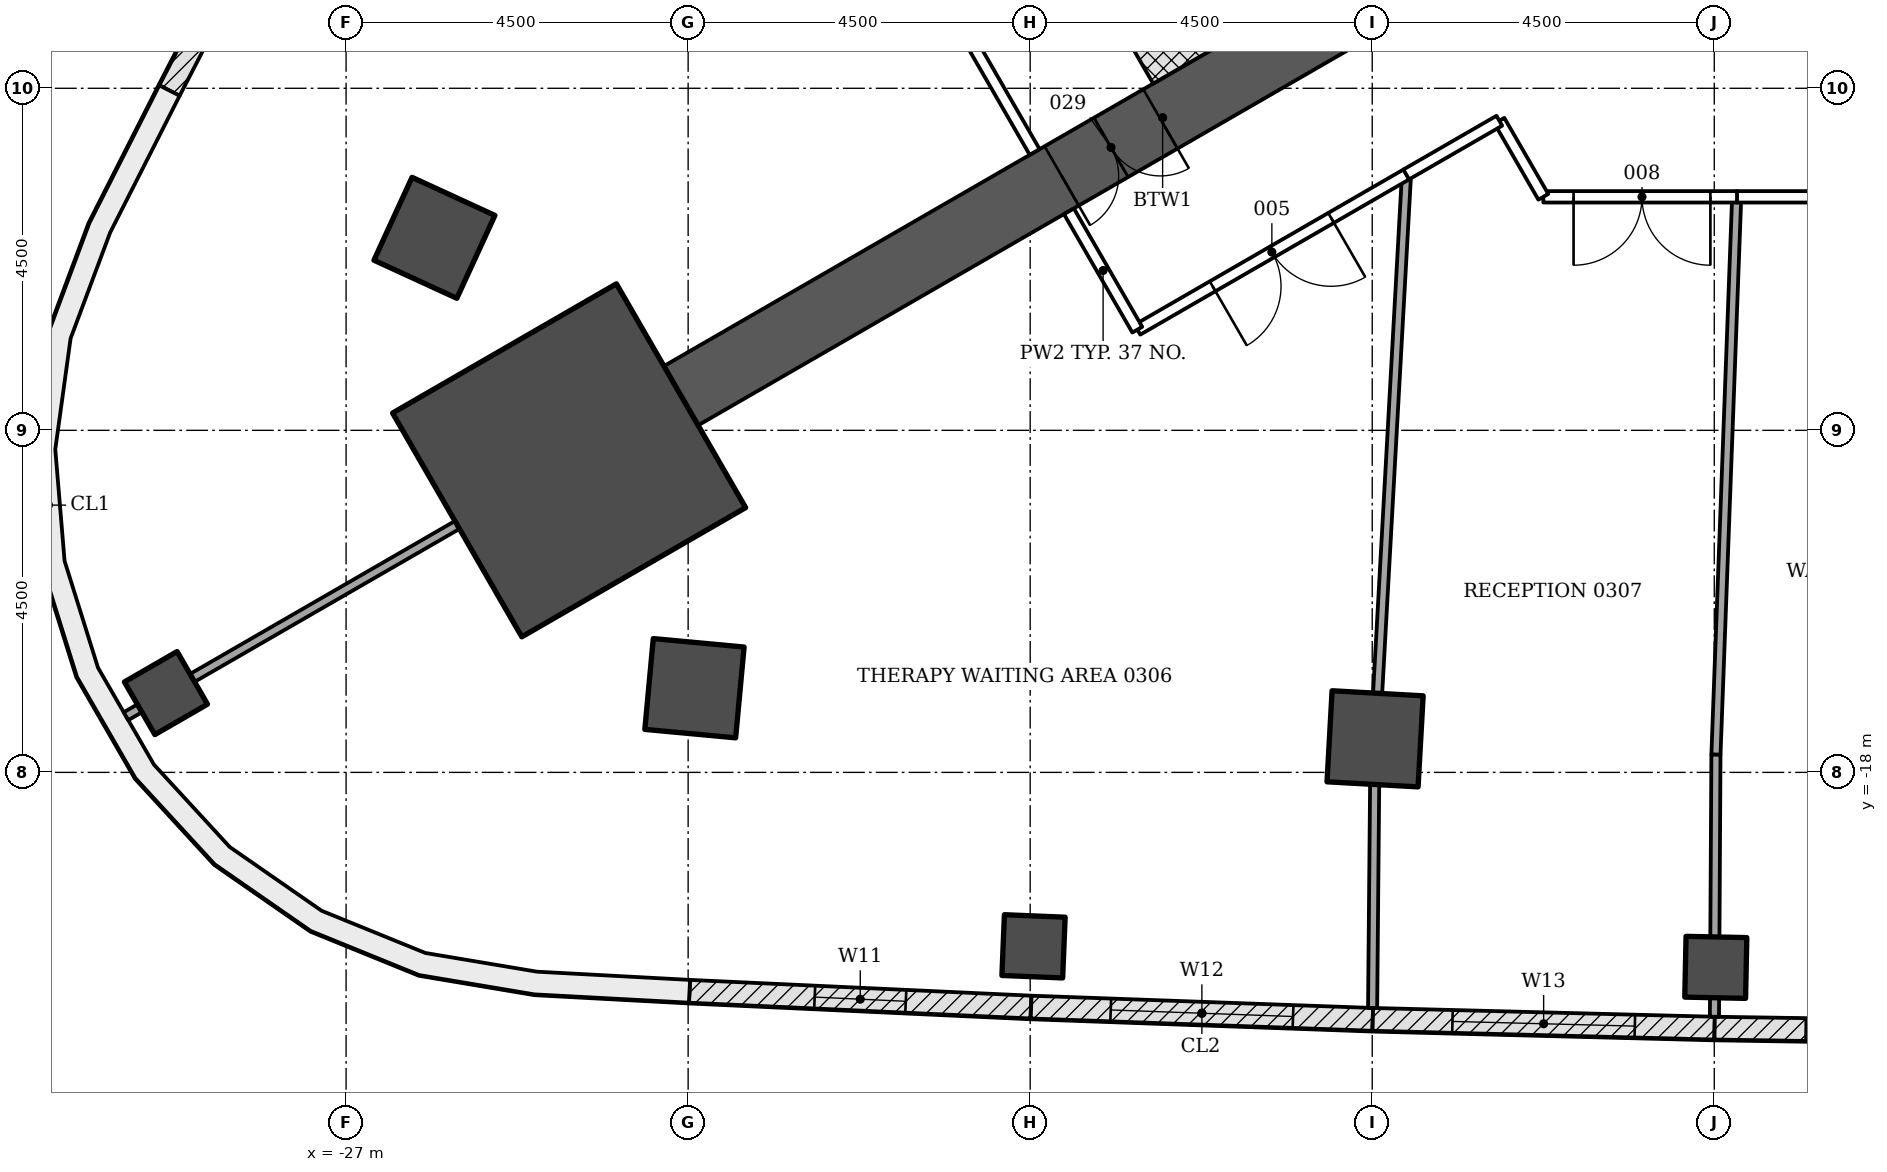
"""IFC4 building model, lengths in metres.
Left out: names, types, materials, properties, quantities, classifications, styles, units other than length and angle.
Written with IfcOpenShell. Run it as: python <this file> out.ifc"""

import sys

from ifc_helpers import new_model, si_unit, direction, frame, frame_2d, origin, origin_2d, place, context, subcontext, project, spatial, polyline, rectangle, outline, extrude, element, fill, save


model = new_model("IFC4")
c1 = context("Model", 3, precision=1e-05, world=origin(), true_north=direction((0.0, 1.0)))
c2 = subcontext(c1, "Body", "Model", "MODEL_VIEW")
j1 = project(units=[si_unit("LENGTHUNIT", "METRE"), si_unit("PLANEANGLEUNIT", "RADIAN")], contexts=[c1])
p1 = place(None, origin())
s1 = spatial("IfcSite", under=j1, at=p1, CompositionType="ELEMENT")
p2 = place(p1, origin())
s2 = spatial("IfcBuilding", under=s1, at=p2, CompositionType="ELEMENT")
p3 = place(p2, frame((0.0, 0.0, 15.0)))
s3 = spatial("IfcBuildingStorey", under=s2, at=p3, CompositionType="ELEMENT", Elevation=15.0)
for number, where, z_axis, x_axis in (
    (1, (-25.838, -10.967, -0.25), (0.0, 0.0, 1.0), (-0.909, 0.418, 0.0)),
    (2, (-22.417, -16.893, -0.25), (0.0, 0.0, 1.0), (-0.093, -0.996, 0.0)),
    (3, (-13.462, -17.558, -0.25), (0.0, 0.0, 1.0), (-0.056, -0.998, 0.0)),
):
    element("IfcColumn", number, at=place(p3, frame(where, z_axis=z_axis, x_axis=x_axis)), inside=s3, PredefinedType="COLUMN", context=c2, shape_type="SweptSolid", body=[
        extrude(rectangle(XDim=1.2, YDim=1.2, at=origin_2d()), origin(), (0.0, 0.0, 1.0), 4.5),
    ])
for number, where, z_axis, x_axis in (
    (4, (-29.37, -16.957, -0.25), (0.0, 0.0, 1.0), (-0.866, -0.5, 0.0)),
    (5, (-17.956, -20.288, -0.25), (0.0, 0.0, 1.0), (-0.041, -0.999, 0.0)),
    (6, (-8.98, -20.565, -0.25), (0.0, 0.0, 1.0), (-0.021, -1.0, 0.0)),
):
    element("IfcColumn", number, at=place(p3, frame(where, z_axis=z_axis, x_axis=x_axis)), inside=s3, PredefinedType="COLUMN", context=c2, shape_type="SweptSolid", body=[
        extrude(rectangle(XDim=0.8, YDim=0.8, at=origin_2d()), origin(), (0.0, 0.0, 1.0), 4.5),
    ])
p4 = place(p3, frame((-9.922, -5.728, -0.25), z_axis=(0.0, 0.0, 1.0), x_axis=(-0.866028046028, -0.499995423472, 0.0)))
e7 = element("IfcWall", 7, at=p4, inside=s3, PredefinedType="SHEAR", context=c2, shape_type="SweptSolid", body=[
    extrude(rectangle(XDim=14.633, YDim=0.9, at=frame_2d((7.316, 0.0))), origin(), (0.0, 0.0, 1.0), 4.5),
])
p5 = place(p4, frame((7.35, 0.0, 0.25)))
e8 = element("IfcOpeningElement", 8, at=p5, cuts=e7, PredefinedType="OPENING", context=c2, shape_type="SweptSolid", body=[
    extrude(rectangle(XDim=1.5, YDim=2.1, at=frame_2d((0.75, 1.05))), frame((0.0, 0.46, 0.0), z_axis=(0.0, -1.0, 0.0), x_axis=(1.0, 0.0, 0.0)), (0.0, 0.0, 1.0), 0.92),
])
p6 = place(p3, frame((-24.066, -13.895, -0.25), z_axis=(0.0, 0.0, 1.0), x_axis=(-0.866025403784, -0.5, 0.0)))
e9 = element("IfcColumn", 9, at=p6, inside=s3, PredefinedType="COLUMN", context=c2, shape_type="SweptSolid", body=[
    extrude(rectangle(XDim=3.4, YDim=3.4, at=origin_2d()), origin(), (0.0, 0.0, 1.0), 4.5),
])
p7 = place(p3, frame((-29.323, -9.029, 0.0), z_axis=(0.0, 0.0, 1.0), x_axis=(0.459443600121, 0.888206945654, 0.0)))
e10 = element("IfcWall", 10, at=p7, inside=s3, PredefinedType="NOTDEFINED", context=c2, shape_type="SweptSolid", body=[
    extrude(rectangle(XDim=4.496, YDim=0.3, at=frame_2d((2.248, 0.0))), origin(), (0.0, 0.0, 1.0), 4.25),
])
p8 = place(p7, frame((1.648, 0.0, 0.8)))
e11 = element("IfcOpeningElement", 11, at=p8, cuts=e10, PredefinedType="OPENING", context=c2, shape_type="SweptSolid", body=[
    extrude(rectangle(XDim=1.2, YDim=3.0, at=frame_2d((0.6, 1.5))), frame((0.0, 0.16, 0.0), z_axis=(0.0, -1.0, 0.0), x_axis=(1.0, 0.0, 0.0)), (0.0, 0.0, 1.0), 0.32),
])
p9 = place(p3, frame((-17.99, -21.088, 0.0), z_axis=(0.0, 0.0, 1.0), x_axis=(-0.998931717866, 0.046210637742, 0.0)))
e12 = element("IfcWall", 12, at=p9, inside=s3, PredefinedType="NOTDEFINED", context=c2, shape_type="SweptSolid", body=[
    extrude(rectangle(XDim=4.496, YDim=0.3, at=frame_2d((2.248, 0.0))), origin(), (0.0, 0.0, 1.0), 4.25),
])
p10 = place(p9, frame((1.648, 0.0, 0.8)))
e13 = element("IfcOpeningElement", 13, at=p10, cuts=e12, PredefinedType="OPENING", context=c2, shape_type="SweptSolid", body=[
    extrude(rectangle(XDim=1.2, YDim=3.0, at=frame_2d((0.6, 1.5))), frame((0.0, 0.16, 0.0), z_axis=(0.0, -1.0, 0.0), x_axis=(1.0, 0.0, 0.0)), (0.0, 0.0, 1.0), 0.32),
])
p11 = place(p3, frame((-13.494, -21.249, 0.0), z_axis=(0.0, 0.0, 1.0), x_axis=(-0.999355640029, 0.035892962294, 0.0)))
e14 = element("IfcWall", 14, at=p11, inside=s3, PredefinedType="NOTDEFINED", context=c2, shape_type="SweptSolid", body=[
    extrude(rectangle(XDim=4.496, YDim=0.3, at=frame_2d((2.248, 0.0))), origin(), (0.0, 0.0, 1.0), 4.25),
])
p12 = place(p11, frame((1.048, 0.0, 0.9)))
e15 = element("IfcOpeningElement", 15, at=p12, cuts=e14, PredefinedType="OPENING", context=c2, shape_type="SweptSolid", body=[
    extrude(rectangle(XDim=2.4, YDim=2.4, at=frame_2d((1.2, 1.2))), frame((0.0, 0.16, 0.0), z_axis=(0.0, -1.0, 0.0), x_axis=(1.0, 0.0, 0.0)), (0.0, 0.0, 1.0), 0.32),
])
p13 = place(p3, frame((-8.998, -21.365, 0.0), z_axis=(0.0, 0.0, 1.0), x_axis=(-0.999671466587, 0.025631209312, 0.0)))
e16 = element("IfcWall", 16, at=p13, inside=s3, PredefinedType="NOTDEFINED", context=c2, shape_type="SweptSolid", body=[
    extrude(rectangle(XDim=4.496, YDim=0.3, at=frame_2d((2.248, 0.0))), origin(), (0.0, 0.0, 1.0), 4.25),
])
p14 = place(p13, frame((1.048, 0.0, 0.9)))
e17 = element("IfcOpeningElement", 17, at=p14, cuts=e16, PredefinedType="OPENING", context=c2, shape_type="SweptSolid", body=[
    extrude(rectangle(XDim=2.4, YDim=2.4, at=frame_2d((1.2, 1.2))), frame((0.0, 0.16, 0.0), z_axis=(0.0, -1.0, 0.0), x_axis=(1.0, 0.0, 0.0)), (0.0, 0.0, 1.0), 0.32),
])
p15 = place(p3, frame((-4.5, -21.434, 0.0), z_axis=(0.0, 0.0, 1.0), x_axis=(-0.999881921814, 0.015366926462, 0.0)))
e18 = element("IfcWall", 18, at=p15, inside=s3, PredefinedType="NOTDEFINED", context=c2, shape_type="SweptSolid", body=[
    extrude(rectangle(XDim=4.496, YDim=0.3, at=frame_2d((2.248, 0.0))), origin(), (0.0, 0.0, 1.0), 4.25),
])
p16 = place(p15, frame((1.198, 0.0, 0.8)))
e19 = element("IfcOpeningElement", 19, at=p16, cuts=e18, PredefinedType="OPENING", context=c2, shape_type="SweptSolid", body=[
    extrude(rectangle(XDim=2.1, YDim=3.0, at=frame_2d((1.05, 1.5))), frame((0.0, 0.16, 0.0), z_axis=(0.0, -1.0, 0.0), x_axis=(1.0, 0.0, 0.0)), (0.0, 0.0, 1.0), 0.32),
])
p17 = place(p3, origin())
e20 = element("IfcWall", 20, at=p17, inside=s3, PredefinedType="NOTDEFINED", context=c2, shape_type="SweptSolid", body=[
    extrude(outline(polyline([(-29.457, -8.962), (-30.379, -10.776), (-30.917, -12.218), (-31.128, -13.742), (-31.0, -15.276), (-30.54, -16.744), (-29.771, -18.077), (-28.729, -19.209), (-27.465, -20.086), (-26.04, -20.666), (-24.522, -20.921), (-22.49, -21.03), (-22.474, -20.73), (-24.489, -20.622), (-25.957, -20.376), (-27.321, -19.821), (-28.531, -18.981), (-29.528, -17.898), (-30.264, -16.623), (-30.704, -15.218), (-30.826, -13.75), (-30.625, -12.292), (-30.104, -10.897), (-29.19, -9.098), (-29.457, -8.962)])), origin(), (0.0, 0.0, 1.0), 4.25),
])
p18 = place(p3, frame((-10.43, -4.847, -0.25), z_axis=(0.0, 0.0, 1.0), x_axis=(-0.866018442252, -0.500012057535, 0.0)))
e21 = element("IfcWall", 21, at=p18, inside=s3, PredefinedType="SHEAR", context=c2, shape_type="SweptSolid", body=[
    extrude(rectangle(XDim=7.2, YDim=1.136, at=frame_2d((3.6, 0.0))), origin(), (0.0, 0.0, 1.0), 4.5),
])
p19 = place(p3, frame((-13.495, -21.099, 0.0), z_axis=(0.0, 0.0, 1.0), x_axis=(0.009216581037, 0.999957526415, 0.0)))
e22 = element("IfcWall", 22, at=p19, inside=s3, PredefinedType="PARTITIONING", context=c2, shape_type="SweptSolid", body=[
    extrude(rectangle(XDim=2.94, YDim=0.12, at=frame_2d((1.47, 0.0))), origin(), (0.0, 0.0, 1.0), 3.633),
])
p20 = place(p3, frame((-13.429, -16.96, 0.0), z_axis=(0.0, 0.0, 1.0), x_axis=(0.055551088657, 0.998455846069, 0.0)))
e23 = element("IfcWall", 23, at=p20, inside=s3, PredefinedType="PARTITIONING", context=c2, shape_type="SweptSolid", body=[
    extrude(rectangle(XDim=6.838, YDim=0.12, at=frame_2d((3.419, 0.0))), origin(), (0.0, 0.0, 1.0), 3.638),
])
p21 = place(p3, frame((-13.045, -10.13, 0.0), z_axis=(0.0, 0.0, 1.0), x_axis=(-0.866035577775, -0.499982377718, 0.0)))
e24 = element("IfcWall", 24, at=p21, inside=s3, PredefinedType="PARTITIONING", context=c2, shape_type="SweptSolid", body=[
    extrude(rectangle(XDim=4.093, YDim=0.15, at=frame_2d((2.046, 0.0))), origin(), (0.0, 0.0, 1.0), 3.638),
])
p22 = place(p21, frame((1.15, 0.0, 0.0)))
e25 = element("IfcOpeningElement", 25, at=p22, cuts=e24, PredefinedType="OPENING", context=c2, shape_type="SweptSolid", body=[
    extrude(rectangle(XDim=1.8, YDim=2.1, at=frame_2d((0.9, 1.05))), frame((0.0, 0.085, 0.0), z_axis=(0.0, -1.0, 0.0), x_axis=(1.0, 0.0, 0.0)), (0.0, 0.0, 1.0), 0.17),
])
p23 = place(p3, frame((-16.591, -12.176, 0.0), z_axis=(0.0, 0.0, 1.0), x_axis=(-0.499965372359, 0.866045395139, 0.0)))
e26 = element("IfcWall", 26, at=p23, inside=s3, PredefinedType="PARTITIONING", context=c2, shape_type="SweptSolid", body=[
    extrude(rectangle(XDim=1.798, YDim=0.15, at=frame_2d((0.899, 0.0))), origin(), (0.0, 0.0, 1.0), 3.638),
])
p24 = place(p3, frame((-29.716, -17.157, 0.0), z_axis=(0.0, 0.0, 1.0), x_axis=(-0.865774595023, -0.500434162116, 0.0)))
e27 = element("IfcWall", 27, at=p24, inside=s3, PredefinedType="PARTITIONING", context=c2, shape_type="SweptSolid", body=[
    extrude(rectangle(XDim=0.208, YDim=0.12, at=frame_2d((0.104, 0.0))), origin(), (0.0, 0.0, 1.0), 4.25),
])
p25 = place(p3, frame((-25.538, -14.745, 0.0), z_axis=(0.0, 0.0, 1.0), x_axis=(-0.866027971625, -0.499995552344, 0.0)))
e28 = element("IfcWall", 28, at=p25, inside=s3, PredefinedType="PARTITIONING", context=c2, shape_type="SweptSolid", body=[
    extrude(rectangle(XDim=4.024, YDim=0.12, at=frame_2d((2.012, 0.0))), origin(), (0.0, 0.0, 1.0), 3.717),
])
p26 = place(p3, frame((-8.996, -20.965, 0.0), z_axis=(0.0, 0.0, 1.0), x_axis=(-0.007812261592, -0.999969483819, 0.0)))
e29 = element("IfcWall", 29, at=p26, inside=s3, PredefinedType="PARTITIONING", context=c2, shape_type="SweptSolid", body=[
    extrude(rectangle(XDim=0.25, YDim=0.12, at=frame_2d((0.125, 0.0))), origin(), (0.0, 0.0, 1.0), 4.25),
])
p27 = place(p3, frame((-8.705, -10.429, 0.0), z_axis=(0.0, 0.0, 1.0), x_axis=(-0.037170289837, -0.999308945999, 0.0)))
e30 = element("IfcWall", 30, at=p27, inside=s3, PredefinedType="PARTITIONING", context=c2, shape_type="SweptSolid", body=[
    extrude(rectangle(XDim=7.343, YDim=0.12, at=frame_2d((3.672, 0.0))), origin(), (0.0, 0.0, 1.0), 3.638),
])
p28 = place(p3, frame((-8.978, -17.767, 0.0), z_axis=(0.0, 0.0, 1.0), x_axis=(-0.005803200997, -0.999983161287, 0.0)))
e31 = element("IfcWall", 31, at=p28, inside=s3, PredefinedType="PARTITIONING", context=c2, shape_type="SweptSolid", body=[
    extrude(rectangle(XDim=2.398, YDim=0.12, at=frame_2d((1.199, 0.0))), origin(), (0.0, 0.0, 1.0), 3.638),
])
p29 = place(p3, frame((-4.347, -10.428, 0.0), z_axis=(0.0, 0.0, 1.0), x_axis=(-1.0, 0.0, 0.0)))
e32 = element("IfcWall", 32, at=p29, inside=s3, PredefinedType="PARTITIONING", context=c2, shape_type="SweptSolid", body=[
    extrude(rectangle(XDim=4.362, YDim=0.15, at=frame_2d((2.181, 0.0))), origin(), (0.0, 0.0, 1.0), 3.638),
])
p30 = place(p29, frame((1.25, 0.0, 0.0)))
e33 = element("IfcOpeningElement", 33, at=p30, cuts=e32, PredefinedType="OPENING", context=c2, shape_type="SweptSolid", body=[
    extrude(rectangle(XDim=1.8, YDim=2.1, at=frame_2d((0.9, 1.05))), frame((0.0, 0.085, 0.0), z_axis=(0.0, -1.0, 0.0), x_axis=(1.0, 0.0, 0.0)), (0.0, 0.0, 1.0), 0.17),
])
p31 = place(p3, frame((-8.701, -10.428, 0.0), z_axis=(0.0, 0.0, 1.0), x_axis=(-1.0, 0.0, 0.0)))
e34 = element("IfcWall", 34, at=p31, inside=s3, PredefinedType="PARTITIONING", context=c2, shape_type="SweptSolid", body=[
    extrude(rectangle(XDim=2.548, YDim=0.15, at=frame_2d((1.274, 0.0))), origin(), (0.0, 0.0, 1.0), 3.638),
])
p32 = place(p31, frame((0.35, 0.0, 0.0)))
e35 = element("IfcOpeningElement", 35, at=p32, cuts=e34, PredefinedType="OPENING", context=c2, shape_type="SweptSolid", body=[
    extrude(rectangle(XDim=1.8, YDim=2.1, at=frame_2d((0.9, 1.05))), frame((0.0, 0.085, 0.0), z_axis=(0.0, -1.0, 0.0), x_axis=(1.0, 0.0, 0.0)), (0.0, 0.0, 1.0), 0.17),
])
p33 = place(p3, frame((-11.249, -10.428, 0.0), z_axis=(0.0, 0.0, 1.0), x_axis=(-0.499978438088, 0.866037852202, 0.0)))
e36 = element("IfcWall", 36, at=p33, inside=s3, PredefinedType="PARTITIONING", context=c2, shape_type="SweptSolid", body=[
    extrude(rectangle(XDim=1.156, YDim=0.15, at=frame_2d((0.578, 0.0))), origin(), (0.0, 0.0, 1.0), 4.25),
])
p34 = place(p3, frame((-11.828, -9.427, 0.0), z_axis=(0.0, 0.0, 1.0), x_axis=(-0.866110865696, -0.499851946404, 0.0)))
e37 = element("IfcWall", 37, at=p34, inside=s3, PredefinedType="PARTITIONING", context=c2, shape_type="SweptSolid", body=[
    extrude(rectangle(XDim=1.415, YDim=0.15, at=frame_2d((0.707, 0.0))), origin(), (0.0, 0.0, 1.0), 3.638),
])
p35 = place(p3, frame((-17.941, -9.838, 0.0), z_axis=(0.0, 0.0, 1.0), x_axis=(-0.500048140185, 0.865997608252, 0.0)))
e38 = element("IfcWall", 38, at=p35, inside=s3, PredefinedType="PARTITIONING", context=c2, shape_type="SweptSolid", body=[
    extrude(rectangle(XDim=6.683, YDim=0.15, at=frame_2d((3.342, 0.0))), origin(), (0.0, 0.0, 1.0), 3.638),
])
p36 = place(p35, frame((2.45, 0.0, 0.0)))
e39 = element("IfcOpeningElement", 39, at=p36, cuts=e38, PredefinedType="OPENING", context=c2, shape_type="SweptSolid", body=[
    extrude(rectangle(XDim=1.8, YDim=2.1, at=frame_2d((0.9, 1.05))), frame((0.0, 0.085, 0.0), z_axis=(0.0, -1.0, 0.0), x_axis=(1.0, 0.0, 0.0)), (0.0, 0.0, 1.0), 0.17),
])
p37 = place(p10, origin())
e40 = element("IfcWindow", 40, at=p37, inside=s3, PartitioningType="SINGLE_PANEL", PredefinedType="WINDOW", context=c2, shape_type="SweptSolid", body=[
    extrude(rectangle(XDim=1.2, YDim=3.0, at=frame_2d((0.6, 1.5))), frame((0.0, 0.03, 0.0), z_axis=(0.0, -1.0, 0.0), x_axis=(1.0, 0.0, 0.0)), (0.0, 0.0, 1.0), 0.06),
])
fill(e13, e40)
p38 = place(p12, origin())
e41 = element("IfcWindow", 41, at=p38, inside=s3, PartitioningType="DOUBLE_PANEL_VERTICAL", PredefinedType="WINDOW", context=c2, shape_type="SweptSolid", body=[
    extrude(rectangle(XDim=2.4, YDim=2.4, at=frame_2d((1.2, 1.2))), frame((0.0, 0.03, 0.0), z_axis=(0.0, -1.0, 0.0), x_axis=(1.0, 0.0, 0.0)), (0.0, 0.0, 1.0), 0.06),
])
fill(e15, e41)
p39 = place(p14, origin())
e42 = element("IfcWindow", 42, at=p39, inside=s3, PartitioningType="DOUBLE_PANEL_VERTICAL", PredefinedType="WINDOW", context=c2, shape_type="SweptSolid", body=[
    extrude(rectangle(XDim=2.4, YDim=2.4, at=frame_2d((1.2, 1.2))), frame((0.0, 0.03, 0.0), z_axis=(0.0, -1.0, 0.0), x_axis=(1.0, 0.0, 0.0)), (0.0, 0.0, 1.0), 0.06),
])
fill(e17, e42)
p40 = place(p16, origin())
e43 = element("IfcWindow", 43, at=p40, inside=s3, PartitioningType="DOUBLE_PANEL_HORIZONTAL", PredefinedType="WINDOW", context=c2, shape_type="SweptSolid", body=[
    extrude(rectangle(XDim=2.1, YDim=3.0, at=frame_2d((1.05, 1.5))), frame((0.0, 0.03, 0.0), z_axis=(0.0, -1.0, 0.0), x_axis=(1.0, 0.0, 0.0)), (0.0, 0.0, 1.0), 0.06),
])
fill(e19, e43)
p41 = place(p22, origin())
e44 = element("IfcDoor", 44, at=p41, inside=s3, OperationType="DOUBLE_DOOR_SINGLE_SWING", PredefinedType="DOOR", context=c2, shape_type="SweptSolid", body=[
    extrude(rectangle(XDim=1.8, YDim=2.1, at=frame_2d((0.9, 1.05))), frame((0.0, 0.025, 0.0), z_axis=(0.0, -1.0, 0.0), x_axis=(1.0, 0.0, 0.0)), (0.0, 0.0, 1.0), 0.05),
])
fill(e25, e44)
p42 = place(p32, origin())
e45 = element("IfcDoor", 45, at=p42, inside=s3, OperationType="DOUBLE_DOOR_SINGLE_SWING", PredefinedType="DOOR", context=c2, shape_type="SweptSolid", body=[
    extrude(rectangle(XDim=1.8, YDim=2.1, at=frame_2d((0.9, 1.05))), frame((0.0, 0.025, 0.0), z_axis=(0.0, -1.0, 0.0), x_axis=(1.0, 0.0, 0.0)), (0.0, 0.0, 1.0), 0.05),
])
fill(e35, e45)
p43 = place(p5, origin())
e46 = element("IfcDoor", 46, at=p43, inside=s3, OperationType="DOUBLE_DOOR_SINGLE_SWING", PredefinedType="DOOR", context=c2, shape_type="SweptSolid", body=[
    extrude(rectangle(XDim=1.5, YDim=2.1, at=frame_2d((0.75, 1.05))), frame((0.0, 0.025, 0.0), z_axis=(0.0, -1.0, 0.0), x_axis=(1.0, 0.0, 0.0)), (0.0, 0.0, 1.0), 0.05),
])
fill(e8, e46)
save(model, sys.argv[1])
